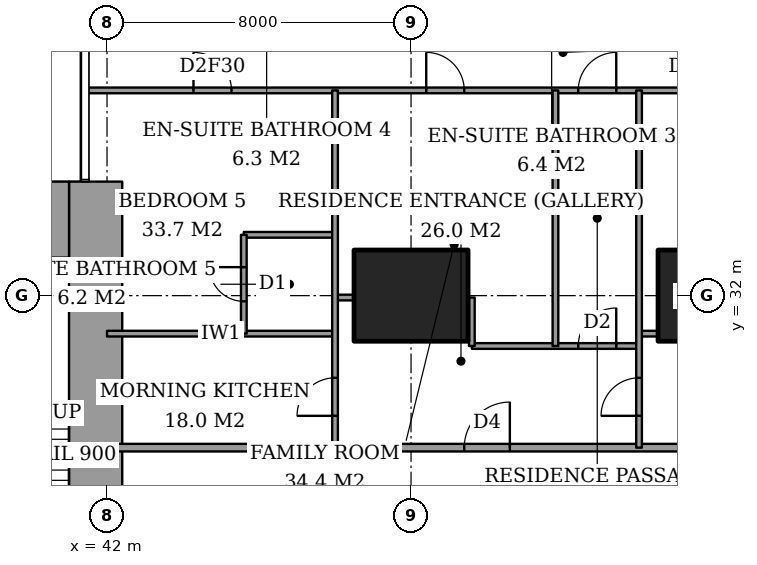
"""IFC4 building model, lengths in metres.
Left out: names, types, materials, properties, quantities, classifications, styles, units other than length and angle.
Written with IfcOpenShell. Run it as: python <this file> out.ifc"""

import sys

from ifc_helpers import new_model, si_unit, direction, frame, frame_2d, origin, origin_2d, place, context, subcontext, project, spatial, rectangle, extrude, element, fill, save


model = new_model("IFC4")
c1 = context("Model", 3, precision=1e-05, world=origin(), true_north=direction((0.0, 1.0)))
c2 = subcontext(c1, "Body", "Model", "MODEL_VIEW")
j1 = project(units=[si_unit("LENGTHUNIT", "METRE"), si_unit("PLANEANGLEUNIT", "RADIAN")], contexts=[c1])
p1 = place(None, origin())
s1 = spatial("IfcSite", under=j1, at=p1, CompositionType="ELEMENT")
p2 = place(p1, origin())
s2 = spatial("IfcBuilding", under=s1, at=p2, CompositionType="ELEMENT")
p3 = place(p2, frame((0.0, 0.0, 193.0)))
s3 = spatial("IfcBuildingStorey", under=s2, at=p3, CompositionType="ELEMENT", Elevation=193.0)
for number, where, z_axis, x_axis in (
    (1, (50.0, 32.0, 0.0), (0.0, 0.0, 1.0), (1.0, 0.0, 0.0)),
    (2, (58.0, 32.0, 0.0), (0.0, 0.0, 1.0), (1.0, 0.0, 0.0)),
):
    element("IfcColumn", number, at=place(p3, frame(where, z_axis=z_axis, x_axis=x_axis)), inside=s3, PredefinedType="COLUMN", context=c2, shape_type="SweptSolid", body=[
        extrude(rectangle(XDim=3.0, YDim=2.4, at=origin_2d()), origin(), (0.0, 0.0, 1.0), 3.6),
    ])
p4 = place(p3, frame((37.85, 34.0, 0.0), z_axis=(0.0, 0.0, 1.0), x_axis=(1.0, 0.0, 0.0)))
e3 = element("IfcWall", 3, at=p4, inside=s3, PredefinedType="SHEAR", context=c2, shape_type="SweptSolid", body=[
    extrude(rectangle(XDim=3.15, YDim=2.0, at=frame_2d((1.575, 0.0))), origin(), (0.0, 0.0, 1.0), 3.6),
])
p5 = place(p3, frame((41.7, 24.85, 0.0), z_axis=(0.0, 0.0, 1.0), x_axis=(0.0, 1.0, 0.0)))
e4 = element("IfcWall", 4, at=p5, inside=s3, PredefinedType="SHEAR", context=c2, shape_type="SweptSolid", body=[
    extrude(rectangle(XDim=10.15, YDim=1.4, at=frame_2d((5.075, 0.0))), origin(), (0.0, 0.0, 1.0), 3.6),
])
p6 = place(p3, frame((42.0, 28.0, 0.0), z_axis=(0.0, 0.0, 1.0), x_axis=(1.0, 0.0, 0.0)))
e5 = element("IfcWall", 5, at=p6, inside=s3, PredefinedType="PARTITIONING", context=c2, shape_type="SweptSolid", body=[
    extrude(rectangle(XDim=17.275, YDim=0.2, at=frame_2d((8.637, 0.0))), origin(), (0.0, 0.0, 1.0), 3.35),
])
p7 = place(p6, frame((9.4, 0.0, 0.0)))
e6 = element("IfcOpeningElement", 6, at=p7, cuts=e5, PredefinedType="OPENING", context=c2, shape_type="SweptSolid", body=[
    extrude(rectangle(XDim=1.2, YDim=2.4, at=frame_2d((0.6, 1.2))), frame((0.0, 0.11, 0.0), z_axis=(0.0, -1.0, 0.0), x_axis=(1.0, 0.0, 0.0)), (0.0, 0.0, 1.0), 0.22),
])
p8 = place(p3, frame((51.6, 30.675, 0.0), z_axis=(0.0, 0.0, 1.0), x_axis=(1.0, 0.0, 0.0)))
e7 = element("IfcWall", 7, at=p8, inside=s3, PredefinedType="PARTITIONING", context=c2, shape_type="SweptSolid", body=[
    extrude(rectangle(XDim=4.4, YDim=0.15, at=frame_2d((2.2, 0.0))), origin(), (0.0, 0.0, 1.0), 3.35),
])
p9 = place(p8, frame((2.8, 0.0, 0.0)))
e8 = element("IfcOpeningElement", 8, at=p9, cuts=e7, PredefinedType="OPENING", context=c2, shape_type="SweptSolid", body=[
    extrude(rectangle(XDim=1.0, YDim=2.1, at=frame_2d((0.5, 1.05))), frame((0.0, 0.085, 0.0), z_axis=(0.0, -1.0, 0.0), x_axis=(1.0, 0.0, 0.0)), (0.0, 0.0, 1.0), 0.17),
])
p10 = place(p3, frame((42.0, 31.0, 0.0), z_axis=(0.0, 0.0, 1.0), x_axis=(1.0, 0.0, 0.0)))
e9 = element("IfcWall", 9, at=p10, inside=s3, PredefinedType="PARTITIONING", context=c2, shape_type="SweptSolid", body=[
    extrude(rectangle(XDim=6.0, YDim=0.15, at=frame_2d((3.0, 0.0))), origin(), (0.0, 0.0, 1.0), 3.35),
])
p11 = place(p3, frame((56.0, 31.0, 0.0), z_axis=(0.0, 0.0, 1.0), x_axis=(1.0, 0.0, 0.0)))
e10 = element("IfcWall", 10, at=p11, inside=s3, PredefinedType="PARTITIONING", context=c2, shape_type="SweptSolid", body=[
    extrude(rectangle(XDim=0.5, YDim=0.15, at=frame_2d((0.25, 0.0))), origin(), (0.0, 0.0, 1.0), 3.35),
])
p12 = place(p3, frame((48.0, 31.95, 0.0), z_axis=(0.0, 0.0, 1.0), x_axis=(1.0, 0.0, 0.0)))
e11 = element("IfcWall", 11, at=p12, inside=s3, PredefinedType="PARTITIONING", context=c2, shape_type="SweptSolid", body=[
    extrude(rectangle(XDim=0.5, YDim=0.15, at=frame_2d((0.25, 0.0))), origin(), (0.0, 0.0, 1.0), 2.634),
])
p13 = place(p3, frame((45.6, 33.6, 0.0), z_axis=(0.0, 0.0, 1.0), x_axis=(1.0, 0.0, 0.0)))
e12 = element("IfcWall", 12, at=p13, inside=s3, PredefinedType="PARTITIONING", context=c2, shape_type="SweptSolid", body=[
    extrude(rectangle(XDim=2.4, YDim=0.15, at=frame_2d((1.2, 0.0))), origin(), (0.0, 0.0, 1.0), 3.35),
])
p14 = place(p3, frame((41.439, 37.4, 0.0), z_axis=(0.0, 0.0, 1.0), x_axis=(1.0, 0.0, 0.0)))
e13 = element("IfcWall", 13, at=p14, inside=s3, PredefinedType="PARTITIONING", context=c2, shape_type="SweptSolid", body=[
    extrude(rectangle(XDim=25.011, YDim=0.15, at=frame_2d((12.505, 0.0))), origin(), (0.0, 0.0, 1.0), 3.35),
])
p15 = place(p14, frame((12.961, 0.0, 0.0)))
e14 = element("IfcOpeningElement", 14, at=p15, cuts=e13, PredefinedType="OPENING", context=c2, shape_type="SweptSolid", body=[
    extrude(rectangle(XDim=1.0, YDim=2.1, at=frame_2d((0.5, 1.05))), frame((0.0, 0.085, 0.0), z_axis=(0.0, -1.0, 0.0), x_axis=(1.0, 0.0, 0.0)), (0.0, 0.0, 1.0), 0.17),
])
p16 = place(p14, frame((20.924, 0.0, 0.0)))
e15 = element("IfcOpeningElement", 15, at=p16, cuts=e13, PredefinedType="OPENING", context=c2, shape_type="SweptSolid", body=[
    extrude(rectangle(XDim=1.0, YDim=2.1, at=frame_2d((0.5, 1.05))), frame((0.0, 0.085, 0.0), z_axis=(0.0, -1.0, 0.0), x_axis=(1.0, 0.0, 0.0)), (0.0, 0.0, 1.0), 0.17),
])
p17 = place(p14, frame((15.749, 0.0, 0.0)))
e16 = element("IfcOpeningElement", 16, at=p17, cuts=e13, PredefinedType="OPENING", context=c2, shape_type="SweptSolid", body=[
    extrude(rectangle(XDim=0.9, YDim=2.1, at=frame_2d((0.45, 1.05))), frame((0.0, 0.085, 0.0), z_axis=(0.0, -1.0, 0.0), x_axis=(1.0, 0.0, 0.0)), (0.0, 0.0, 1.0), 0.17),
])
p18 = place(p14, frame((8.961, 0.0, 0.0)))
e17 = element("IfcOpeningElement", 17, at=p18, cuts=e13, PredefinedType="OPENING", context=c2, shape_type="SweptSolid", body=[
    extrude(rectangle(XDim=1.0, YDim=2.1, at=frame_2d((0.5, 1.05))), frame((0.0, 0.085, 0.0), z_axis=(0.0, -1.0, 0.0), x_axis=(1.0, 0.0, 0.0)), (0.0, 0.0, 1.0), 0.17),
])
p19 = place(p14, frame((2.836, 0.0, 0.0)))
e18 = element("IfcOpeningElement", 18, at=p19, cuts=e13, PredefinedType="OPENING", context=c2, shape_type="SweptSolid", body=[
    extrude(rectangle(XDim=1.0, YDim=2.1, at=frame_2d((0.5, 1.05))), frame((0.0, 0.085, 0.0), z_axis=(0.0, -1.0, 0.0), x_axis=(1.0, 0.0, 0.0)), (0.0, 0.0, 1.0), 0.17),
])
p20 = place(p3, frame((45.6, 31.0, 0.0), z_axis=(0.0, 0.0, 1.0), x_axis=(0.0, 1.0, 0.0)))
e19 = element("IfcWall", 19, at=p20, inside=s3, PredefinedType="PARTITIONING", context=c2, shape_type="SweptSolid", body=[
    extrude(rectangle(XDim=2.6, YDim=0.15, at=frame_2d((1.3, 0.0))), origin(), (0.0, 0.0, 1.0), 3.35),
])
p21 = place(p20, frame((0.85, 0.0, 0.0)))
e20 = element("IfcOpeningElement", 20, at=p21, cuts=e19, PredefinedType="OPENING", context=c2, shape_type="SweptSolid", body=[
    extrude(rectangle(XDim=0.9, YDim=2.1, at=frame_2d((0.45, 1.05))), frame((0.0, 0.085, 0.0), z_axis=(0.0, -1.0, 0.0), x_axis=(1.0, 0.0, 0.0)), (0.0, 0.0, 1.0), 0.17),
])
p22 = place(p3, frame((48.0, 28.0, 0.0), z_axis=(0.0, 0.0, 1.0), x_axis=(0.0, 1.0, 0.0)))
e21 = element("IfcWall", 21, at=p22, inside=s3, PredefinedType="PARTITIONING", context=c2, shape_type="SweptSolid", body=[
    extrude(rectangle(XDim=9.4, YDim=0.15, at=frame_2d((4.7, 0.0))), origin(), (0.0, 0.0, 1.0), 3.35),
])
p23 = place(p22, frame((0.837, 0.0, 0.0)))
e22 = element("IfcOpeningElement", 22, at=p23, cuts=e21, PredefinedType="OPENING", context=c2, shape_type="SweptSolid", body=[
    extrude(rectangle(XDim=1.0, YDim=2.1, at=frame_2d((0.5, 1.05))), frame((0.0, 0.085, 0.0), z_axis=(0.0, -1.0, 0.0), x_axis=(1.0, 0.0, 0.0)), (0.0, 0.0, 1.0), 0.17),
])
p24 = place(p3, frame((51.6, 30.675, 0.0), z_axis=(0.0, 0.0, 1.0), x_axis=(0.0, 1.0, 0.0)))
e23 = element("IfcWall", 23, at=p24, inside=s3, PredefinedType="PARTITIONING", context=c2, shape_type="SweptSolid", body=[
    extrude(rectangle(XDim=1.275, YDim=0.15, at=frame_2d((0.637, 0.0))), origin(), (0.0, 0.0, 1.0), 3.35),
])
p25 = place(p3, frame((53.8, 30.675, 0.0), z_axis=(0.0, 0.0, 1.0), x_axis=(0.0, 1.0, 0.0)))
e24 = element("IfcWall", 24, at=p25, inside=s3, PredefinedType="PARTITIONING", context=c2, shape_type="SweptSolid", body=[
    extrude(rectangle(XDim=6.725, YDim=0.15, at=frame_2d((3.362, 0.0))), origin(), (0.0, 0.0, 1.0), 3.35),
])
p26 = place(p3, frame((56.0, 28.0, 0.0), z_axis=(0.0, 0.0, 1.0), x_axis=(0.0, 1.0, 0.0)))
e25 = element("IfcWall", 25, at=p26, inside=s3, PredefinedType="PARTITIONING", context=c2, shape_type="SweptSolid", body=[
    extrude(rectangle(XDim=9.4, YDim=0.15, at=frame_2d((4.7, 0.0))), origin(), (0.0, 0.0, 1.0), 3.35),
])
p27 = place(p26, frame((0.837, 0.0, 0.0)))
e26 = element("IfcOpeningElement", 26, at=p27, cuts=e25, PredefinedType="OPENING", context=c2, shape_type="SweptSolid", body=[
    extrude(rectangle(XDim=1.0, YDim=2.1, at=frame_2d((0.5, 1.05))), frame((0.0, 0.085, 0.0), z_axis=(0.0, -1.0, 0.0), x_axis=(1.0, 0.0, 0.0)), (0.0, 0.0, 1.0), 0.17),
])
p28 = place(p15, origin())
e27 = element("IfcDoor", 27, at=p28, inside=s3, OperationType="SINGLE_SWING_LEFT", PredefinedType="DOOR", context=c2, shape_type="SweptSolid", body=[
    extrude(rectangle(XDim=1.0, YDim=2.1, at=frame_2d((0.5, 1.05))), frame((0.0, 0.025, 0.0), z_axis=(0.0, -1.0, 0.0), x_axis=(1.0, 0.0, 0.0)), (0.0, 0.0, 1.0), 0.05),
])
fill(e14, e27)
p29 = place(p27, origin())
e28 = element("IfcDoor", 28, at=p29, inside=s3, OperationType="SINGLE_SWING_RIGHT", PredefinedType="DOOR", context=c2, shape_type="SweptSolid", body=[
    extrude(rectangle(XDim=1.0, YDim=2.1, at=frame_2d((0.5, 1.05))), frame((0.0, 0.025, 0.0), z_axis=(0.0, -1.0, 0.0), x_axis=(1.0, 0.0, 0.0)), (0.0, 0.0, 1.0), 0.05),
])
fill(e26, e28)
p30 = place(p7, origin())
e29 = element("IfcDoor", 29, at=p30, inside=s3, OperationType="SINGLE_SWING_LEFT", PredefinedType="DOOR", context=c2, shape_type="SweptSolid", body=[
    extrude(rectangle(XDim=1.2, YDim=2.4, at=frame_2d((0.6, 1.2))), frame((0.0, 0.025, 0.0), z_axis=(0.0, -1.0, 0.0), x_axis=(1.0, 0.0, 0.0)), (0.0, 0.0, 1.0), 0.05),
])
fill(e6, e29)
p31 = place(p9, origin())
e30 = element("IfcDoor", 30, at=p31, inside=s3, OperationType="SINGLE_SWING_LEFT", PredefinedType="DOOR", context=c2, shape_type="SweptSolid", body=[
    extrude(rectangle(XDim=1.0, YDim=2.1, at=frame_2d((0.5, 1.05))), frame((0.0, 0.025, 0.0), z_axis=(0.0, -1.0, 0.0), x_axis=(1.0, 0.0, 0.0)), (0.0, 0.0, 1.0), 0.05),
])
fill(e8, e30)
p32 = place(p18, origin())
e31 = element("IfcDoor", 31, at=p32, inside=s3, OperationType="SINGLE_SWING_RIGHT", PredefinedType="DOOR", context=c2, shape_type="SweptSolid", body=[
    extrude(rectangle(XDim=1.0, YDim=2.1, at=frame_2d((0.5, 1.05))), frame((0.0, 0.025, 0.0), z_axis=(0.0, -1.0, 0.0), x_axis=(1.0, 0.0, 0.0)), (0.0, 0.0, 1.0), 0.05),
])
fill(e17, e31)
p33 = place(p21, origin())
e32 = element("IfcDoor", 32, at=p33, inside=s3, OperationType="SINGLE_SWING_LEFT", PredefinedType="DOOR", context=c2, shape_type="SweptSolid", body=[
    extrude(rectangle(XDim=0.9, YDim=2.1, at=frame_2d((0.45, 1.05))), frame((0.0, 0.025, 0.0), z_axis=(0.0, -1.0, 0.0), x_axis=(1.0, 0.0, 0.0)), (0.0, 0.0, 1.0), 0.05),
])
fill(e20, e32)
p34 = place(p19, origin())
e33 = element("IfcDoor", 33, at=p34, inside=s3, OperationType="SINGLE_SWING_RIGHT", PredefinedType="DOOR", context=c2, shape_type="SweptSolid", body=[
    extrude(rectangle(XDim=1.0, YDim=2.1, at=frame_2d((0.5, 1.05))), frame((0.0, 0.025, 0.0), z_axis=(0.0, -1.0, 0.0), x_axis=(1.0, 0.0, 0.0)), (0.0, 0.0, 1.0), 0.05),
])
fill(e18, e33)
p35 = place(p23, origin())
e34 = element("IfcDoor", 34, at=p35, inside=s3, OperationType="SINGLE_SWING_RIGHT", PredefinedType="DOOR", context=c2, shape_type="SweptSolid", body=[
    extrude(rectangle(XDim=1.0, YDim=2.1, at=frame_2d((0.5, 1.05))), frame((0.0, 0.025, 0.0), z_axis=(0.0, -1.0, 0.0), x_axis=(1.0, 0.0, 0.0)), (0.0, 0.0, 1.0), 0.05),
])
fill(e22, e34)
save(model, sys.argv[1])
